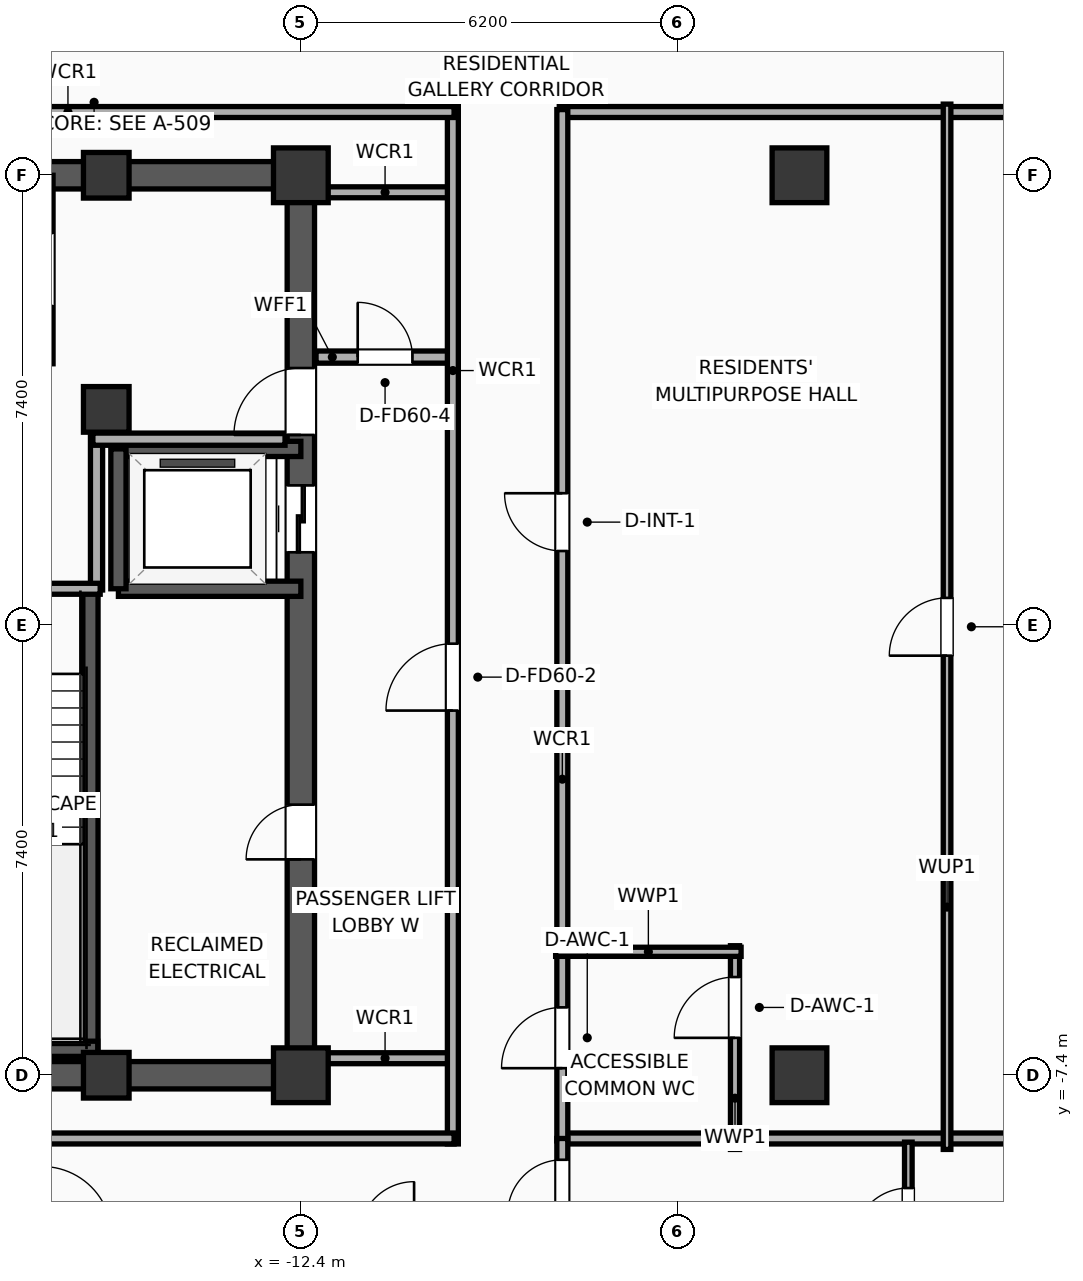
"""IFC4 building model, lengths in metres.
Left out: names, types, materials, properties, quantities, classifications, styles, units other than length and angle.
Written with IfcOpenShell. Run it as: python <this file> out.ifc"""

import sys

from ifc_helpers import new_model, si_unit, direction, frame, frame_2d, origin, origin_2d, place, context, subcontext, project, spatial, rectangle, extrude, element, fill, save


model = new_model("IFC4")
c1 = context("Model", 3, precision=1e-05, world=origin(), true_north=direction((0.0, 1.0)))
c2 = subcontext(c1, "Body", "Model", "MODEL_VIEW")
j1 = project(units=[si_unit("LENGTHUNIT", "METRE"), si_unit("PLANEANGLEUNIT", "RADIAN")], contexts=[c1])
p1 = place(None, origin())
s1 = spatial("IfcSite", under=j1, at=p1, CompositionType="ELEMENT")
p2 = place(p1, origin())
s2 = spatial("IfcBuilding", under=s1, at=p2, CompositionType="ELEMENT")
p3 = place(p2, frame((0.0, 0.0, 211.9)))
s3 = spatial("IfcBuildingStorey", under=s2, at=p3, CompositionType="ELEMENT", Elevation=211.9)
for number, where, z_axis, x_axis in (
    (1, (-15.6, -7.4, 0.0), (0.0, 0.0, 1.0), (1.0, 0.0, 0.0)),
    (2, (-15.6, 7.4, 0.0), (0.0, 0.0, 1.0), (1.0, 0.0, 0.0)),
):
    element("IfcColumn", number, at=place(p3, frame(where, z_axis=z_axis, x_axis=x_axis)), inside=s3, PredefinedType="COLUMN", context=c2, shape_type="SweptSolid", body=[
        extrude(rectangle(XDim=0.75, YDim=0.75, at=origin_2d()), origin(), (0.0, 0.0, 1.0), 3.9),
    ])
p4 = place(p3, frame((-12.4, -7.4, 0.0), z_axis=(0.0, 0.0, 1.0), x_axis=(1.0, 0.0, 0.0)))
e3 = element("IfcColumn", 3, at=p4, inside=s3, PredefinedType="COLUMN", context=c2, shape_type="SweptSolid", body=[
    extrude(rectangle(XDim=0.9, YDim=0.9, at=origin_2d()), origin(), (0.0, 0.0, 1.0), 3.9),
])
p5 = place(p3, frame((-15.6, 3.55, 0.0), z_axis=(0.0, 0.0, 1.0), x_axis=(1.0, 0.0, 0.0)))
e4 = element("IfcColumn", 4, at=p5, inside=s3, PredefinedType="COLUMN", context=c2, shape_type="SweptSolid", body=[
    extrude(rectangle(XDim=0.75, YDim=0.75, at=origin_2d()), origin(), (0.0, 0.0, 1.0), 3.9),
])
p6 = place(p3, frame((-12.4, 7.4, 0.0), z_axis=(0.0, 0.0, 1.0), x_axis=(1.0, 0.0, 0.0)))
e5 = element("IfcColumn", 5, at=p6, inside=s3, PredefinedType="COLUMN", context=c2, shape_type="SweptSolid", body=[
    extrude(rectangle(XDim=0.9, YDim=0.9, at=origin_2d()), origin(), (0.0, 0.0, 1.0), 3.9),
])
for number, where, z_axis, x_axis in (
    (6, (-19.425, -7.4, 0.0), (0.0, 0.0, 1.0), (1.0, 0.0, 0.0)),
    (7, (-19.425, 7.4, 0.0), (0.0, 0.0, 1.0), (1.0, 0.0, 0.0)),
):
    element("IfcWall", number, at=place(p3, frame(where, z_axis=z_axis, x_axis=x_axis)), inside=s3, PredefinedType="SHEAR", context=c2, shape_type="SweptSolid", body=[
        extrude(rectangle(XDim=7.25, YDim=0.45, at=frame_2d((3.625, 0.0))), origin(), (0.0, 0.0, 1.0), 3.65),
    ])
p7 = place(p3, frame((-12.4, -7.4, 0.0), z_axis=(0.0, 0.0, 1.0), x_axis=(0.0, 1.0, 0.0)))
e8 = element("IfcWall", 8, at=p7, inside=s3, PredefinedType="SHEAR", context=c2, shape_type="SweptSolid", body=[
    extrude(rectangle(XDim=14.8, YDim=0.45, at=frame_2d((7.4, 0.0))), origin(), (0.0, 0.0, 1.0), 3.65),
])
p8 = place(p7, frame((8.6, 0.0, 0.0)))
e9 = element("IfcOpeningElement", 9, at=p8, cuts=e8, PredefinedType="OPENING", context=c2, shape_type="SweptSolid", body=[
    extrude(rectangle(XDim=1.1, YDim=2.05, at=frame_2d((0.55, 1.025))), frame((0.0, 0.235, 0.0), z_axis=(0.0, -1.0, 0.0), x_axis=(1.0, 0.0, 0.0)), (0.0, 0.0, 1.0), 0.47),
])
p9 = place(p7, frame((10.53, 0.0, 0.0)))
e10 = element("IfcOpeningElement", 10, at=p9, cuts=e8, PredefinedType="OPENING", context=c2, shape_type="SweptSolid", body=[
    extrude(rectangle(XDim=1.1, YDim=2.05, at=frame_2d((0.55, 1.025))), frame((0.0, 0.235, 0.0), z_axis=(0.0, -1.0, 0.0), x_axis=(1.0, 0.0, 0.0)), (0.0, 0.0, 1.0), 0.47),
])
p10 = place(p7, frame((3.55, 0.0, 0.0)))
e11 = element("IfcOpeningElement", 11, at=p10, cuts=e8, PredefinedType="OPENING", context=c2, shape_type="SweptSolid", body=[
    extrude(rectangle(XDim=0.9, YDim=2.05, at=frame_2d((0.45, 1.025))), frame((0.0, 0.235, 0.0), z_axis=(0.0, -1.0, 0.0), x_axis=(1.0, 0.0, 0.0)), (0.0, 0.0, 1.0), 0.47),
])
p11 = place(p3, frame((-15.86, -7.085, 0.0), z_axis=(0.0, 0.0, 1.0), x_axis=(0.0, 1.0, 0.0)))
e12 = element("IfcWall", 12, at=p11, inside=s3, PredefinedType="SOLIDWALL", context=c2, shape_type="SweptSolid", body=[
    extrude(rectangle(XDim=7.685, YDim=0.25, at=frame_2d((3.843, 0.0))), origin(), (0.0, 0.0, 1.0), 3.65),
])
p12 = place(p3, frame((-19.2, -6.965, 0.0), z_axis=(0.0, 0.0, 1.0), x_axis=(1.0, 0.0, 0.0)))
e13 = element("IfcWall", 13, at=p12, inside=s3, PredefinedType="SOLIDWALL", context=c2, shape_type="SweptSolid", body=[
    extrude(rectangle(XDim=3.46, YDim=0.25, at=frame_2d((1.73, 0.0))), origin(), (0.0, 0.0, 1.0), 3.65),
])
for number, where, z_axis, x_axis in (
    (14, (-4.2, -7.4, 0.0), (0.0, 0.0, 1.0), (1.0, 0.0, 0.0)),
    (15, (-4.2, 7.4, 0.0), (0.0, 0.0, 1.0), (1.0, 0.0, 0.0)),
):
    element("IfcColumn", number, at=place(p3, frame(where, z_axis=z_axis, x_axis=x_axis)), inside=s3, PredefinedType="COLUMN", context=c2, shape_type="SweptSolid", body=[
        extrude(rectangle(XDim=0.9, YDim=0.9, at=origin_2d()), origin(), (0.0, 0.0, 1.0), 3.9),
    ])
p13 = place(p3, frame((-16.6, 4.3, 0.0), z_axis=(0.0, 0.0, 1.0), x_axis=(0.0, 1.0, 0.0)))
e16 = element("IfcWall", 16, at=p13, inside=s3, PredefinedType="SOLIDWALL", context=c2, shape_type="SweptSolid", body=[
    extrude(rectangle(XDim=3.1, YDim=0.25, at=frame_2d((1.55, 0.0))), origin(), (0.0, 0.0, 1.0), 3.65),
])
p14 = place(p13, frame((0.95, 0.0, 0.0)))
e17 = element("IfcOpeningElement", 17, at=p14, cuts=e16, PredefinedType="OPENING", context=c2, shape_type="SweptSolid", body=[
    extrude(rectangle(XDim=1.2, YDim=2.05, at=frame_2d((0.6, 1.025))), frame((0.0, 0.135, 0.0), z_axis=(0.0, -1.0, 0.0), x_axis=(1.0, 0.0, 0.0)), (0.0, 0.0, 1.0), 0.27),
])
for number, where, z_axis, x_axis in (
    (18, (-15.4, 0.6, 0.0), (0.0, 0.0, 1.0), (1.0, 0.0, 0.0)),
    (19, (-12.4, 2.9, 0.0), (0.0, 0.0, 1.0), (-1.0, 0.0, 0.0)),
):
    element("IfcWall", number, at=place(p3, frame(where, z_axis=z_axis, x_axis=x_axis)), inside=s3, PredefinedType="SOLIDWALL", context=c2, shape_type="SweptSolid", body=[
        extrude(rectangle(XDim=3.0, YDim=0.25, at=frame_2d((1.5, 0.0))), origin(), (0.0, 0.0, 1.0), 3.65),
    ])
p15 = place(p3, frame((-15.4, 2.9, 0.0), z_axis=(0.0, 0.0, 1.0), x_axis=(0.0, -1.0, 0.0)))
e20 = element("IfcWall", 20, at=p15, inside=s3, PredefinedType="SOLIDWALL", context=c2, shape_type="SweptSolid", body=[
    extrude(rectangle(XDim=2.3, YDim=0.25, at=frame_2d((1.15, 0.0))), origin(), (0.0, 0.0, 1.0), 3.65),
])
p16 = place(p3, frame((-15.76, 0.58, 0.0), z_axis=(0.0, 0.0, 1.0), x_axis=(0.0, 1.0, 0.0)))
e21 = element("IfcWall", 21, at=p16, inside=s3, PredefinedType="PARTITIONING", context=c2, shape_type="SweptSolid", body=[
    extrude(rectangle(XDim=2.52, YDim=0.2, at=frame_2d((1.26, 0.0))), origin(), (0.0, 0.0, 1.0), 3.65),
])
p17 = place(p3, frame((-15.82, 3.06, 0.0), z_axis=(0.0, 0.0, 1.0), x_axis=(1.0, 0.0, 0.0)))
e22 = element("IfcWall", 22, at=p17, inside=s3, PredefinedType="PARTITIONING", context=c2, shape_type="SweptSolid", body=[
    extrude(rectangle(XDim=3.16, YDim=0.2, at=frame_2d((1.58, 0.0))), origin(), (0.0, 0.0, 1.0), 3.65),
])
p18 = place(p3, frame((-19.06, 0.6, 0.0), z_axis=(0.0, 0.0, 1.0), x_axis=(1.0, 0.0, 0.0)))
e23 = element("IfcWall", 23, at=p18, inside=s3, PredefinedType="PARTITIONING", context=c2, shape_type="SweptSolid", body=[
    extrude(rectangle(XDim=3.36, YDim=0.18, at=frame_2d((1.68, 0.0))), origin(), (0.0, 0.0, 1.0), 3.65),
])
p19 = place(p18, frame((1.155, 0.0, 0.0)))
e24 = element("IfcOpeningElement", 24, at=p19, cuts=e23, PredefinedType="OPENING", context=c2, shape_type="SweptSolid", body=[
    extrude(rectangle(XDim=1.05, YDim=2.05, at=frame_2d((0.525, 1.025))), frame((0.0, 0.1, 0.0), z_axis=(0.0, -1.0, 0.0), x_axis=(1.0, 0.0, 0.0)), (0.0, 0.0, 1.0), 0.2),
])
p20 = place(p3, frame((-12.15, 4.41, 0.0), z_axis=(0.0, 0.0, 1.0), x_axis=(1.0, 0.0, 0.0)))
e25 = element("IfcWall", 25, at=p20, inside=s3, PredefinedType="PARTITIONING", context=c2, shape_type="SweptSolid", body=[
    extrude(rectangle(XDim=2.27, YDim=0.2, at=frame_2d((1.135, 0.0))), origin(), (0.0, 0.0, 1.0), 3.65),
])
p21 = place(p20, frame((0.685, 0.0, 0.0)))
e26 = element("IfcOpeningElement", 26, at=p21, cuts=e25, PredefinedType="OPENING", context=c2, shape_type="SweptSolid", body=[
    extrude(rectangle(XDim=0.9, YDim=2.05, at=frame_2d((0.45, 1.025))), frame((0.0, 0.11, 0.0), z_axis=(0.0, -1.0, 0.0), x_axis=(1.0, 0.0, 0.0)), (0.0, 0.0, 1.0), 0.22),
])
for number, where, z_axis, x_axis in (
    (27, (-12.15, 7.12, 0.0), (0.0, 0.0, 1.0), (1.0, 0.0, 0.0)),
    (28, (-12.15, -7.12, 0.0), (0.0, 0.0, 1.0), (1.0, 0.0, 0.0)),
):
    element("IfcWall", number, at=place(p3, frame(where, z_axis=z_axis, x_axis=x_axis)), inside=s3, PredefinedType="PARTITIONING", context=c2, shape_type="SweptSolid", body=[
        extrude(rectangle(XDim=2.27, YDim=0.18, at=frame_2d((1.135, 0.0))), origin(), (0.0, 0.0, 1.0), 3.65),
    ])
p22 = place(p3, frame((-9.9, -8.53, 0.0), z_axis=(0.0, 0.0, 1.0), x_axis=(0.0, 1.0, 0.0)))
e29 = element("IfcWall", 29, at=p22, inside=s3, PredefinedType="PARTITIONING", context=c2, shape_type="SweptSolid", body=[
    extrude(rectangle(XDim=17.06, YDim=0.18, at=frame_2d((8.53, 0.0))), origin(), (0.0, 0.0, 1.0), 3.65),
])
p23 = place(p22, frame((7.127, 0.0, 0.0)))
e30 = element("IfcOpeningElement", 30, at=p23, cuts=e29, PredefinedType="OPENING", context=c2, shape_type="SweptSolid", body=[
    extrude(rectangle(XDim=1.1, YDim=2.05, at=frame_2d((0.55, 1.025))), frame((0.0, 0.1, 0.0), z_axis=(0.0, -1.0, 0.0), x_axis=(1.0, 0.0, 0.0)), (0.0, 0.0, 1.0), 0.2),
])
p24 = place(p3, frame((-26.23, 8.44, 0.0), z_axis=(0.0, 0.0, 1.0), x_axis=(1.0, 0.0, 0.0)))
e31 = element("IfcWall", 31, at=p24, inside=s3, PredefinedType="PARTITIONING", context=c2, shape_type="SweptSolid", body=[
    extrude(rectangle(XDim=16.35, YDim=0.18, at=frame_2d((8.175, 0.0))), origin(), (0.0, 0.0, 1.0), 3.65),
])
p25 = place(p24, frame((2.35, 0.0, 0.0)))
e32 = element("IfcOpeningElement", 32, at=p25, cuts=e31, PredefinedType="OPENING", context=c2, shape_type="SweptSolid", body=[
    extrude(rectangle(XDim=1.15, YDim=2.05, at=frame_2d((0.575, 1.025))), frame((0.0, 0.1, 0.0), z_axis=(0.0, -1.0, 0.0), x_axis=(1.0, 0.0, 0.0)), (0.0, 0.0, 1.0), 0.2),
])
p26 = place(p3, frame((-26.23, -8.44, 0.0), z_axis=(0.0, 0.0, 1.0), x_axis=(1.0, 0.0, 0.0)))
e33 = element("IfcWall", 33, at=p26, inside=s3, PredefinedType="PARTITIONING", context=c2, shape_type="SweptSolid", body=[
    extrude(rectangle(XDim=16.35, YDim=0.18, at=frame_2d((8.175, 0.0))), origin(), (0.0, 0.0, 1.0), 3.65),
])
p27 = place(p3, frame((-8.15, 8.44, 0.0), z_axis=(0.0, 0.0, 1.0), x_axis=(1.0, 0.0, 0.0)))
e34 = element("IfcWall", 34, at=p27, inside=s3, PredefinedType="PARTITIONING", context=c2, shape_type="SweptSolid", body=[
    extrude(rectangle(XDim=16.3, YDim=0.18, at=frame_2d((8.15, 0.0))), origin(), (0.0, 0.0, 1.0), 3.65),
])
p28 = place(p27, frame((8.49, 0.0, 0.0)))
e35 = element("IfcOpeningElement", 35, at=p28, cuts=e34, PredefinedType="OPENING", context=c2, shape_type="SweptSolid", body=[
    extrude(rectangle(XDim=0.95, YDim=2.05, at=frame_2d((0.475, 1.025))), frame((0.0, 0.1, 0.0), z_axis=(0.0, -1.0, 0.0), x_axis=(1.0, 0.0, 0.0)), (0.0, 0.0, 1.0), 0.2),
])
p29 = place(p3, frame((-8.15, -8.44, 0.0), z_axis=(0.0, 0.0, 1.0), x_axis=(1.0, 0.0, 0.0)))
e36 = element("IfcWall", 36, at=p29, inside=s3, PredefinedType="PARTITIONING", context=c2, shape_type="SweptSolid", body=[
    extrude(rectangle(XDim=16.3, YDim=0.18, at=frame_2d((8.15, 0.0))), origin(), (0.0, 0.0, 1.0), 3.65),
])
p30 = place(p3, frame((-8.1, -8.48, 0.0), z_axis=(0.0, 0.0, 1.0), x_axis=(0.0, 1.0, 0.0)))
e37 = element("IfcWall", 37, at=p30, inside=s3, PredefinedType="PARTITIONING", context=c2, shape_type="SweptSolid", body=[
    extrude(rectangle(XDim=16.96, YDim=0.18, at=frame_2d((8.48, 0.0))), origin(), (0.0, 0.0, 1.0), 3.65),
])
p31 = place(p30, frame((1.196, 0.0, 0.0)))
e38 = element("IfcOpeningElement", 38, at=p31, cuts=e37, PredefinedType="OPENING", context=c2, shape_type="SweptSolid", body=[
    extrude(rectangle(XDim=1.0, YDim=2.05, at=frame_2d((0.5, 1.025))), frame((0.0, 0.1, 0.0), z_axis=(0.0, -1.0, 0.0), x_axis=(1.0, 0.0, 0.0)), (0.0, 0.0, 1.0), 0.2),
])
p32 = place(p30, frame((9.701, 0.0, 0.0)))
e39 = element("IfcOpeningElement", 39, at=p32, cuts=e37, PredefinedType="OPENING", context=c2, shape_type="SweptSolid", body=[
    extrude(rectangle(XDim=0.95, YDim=2.05, at=frame_2d((0.475, 1.025))), frame((0.0, 0.1, 0.0), z_axis=(0.0, -1.0, 0.0), x_axis=(1.0, 0.0, 0.0)), (0.0, 0.0, 1.0), 0.2),
])
p33 = place(p3, frame((-5.26, -8.62, 0.0), z_axis=(0.0, 0.0, 1.0), x_axis=(0.0, 1.0, 0.0)))
e40 = element("IfcWall", 40, at=p33, inside=s3, PredefinedType="PLUMBINGWALL", context=c2, shape_type="SweptSolid", body=[
    extrude(rectangle(XDim=3.35, YDim=0.15, at=frame_2d((1.675, 0.0))), origin(), (0.0, 0.0, 1.0), 3.65),
])
p34 = place(p33, frame((1.835, 0.0, 0.0)))
e41 = element("IfcOpeningElement", 41, at=p34, cuts=e40, PredefinedType="OPENING", context=c2, shape_type="SweptSolid", body=[
    extrude(rectangle(XDim=1.0, YDim=2.05, at=frame_2d((0.5, 1.025))), frame((0.0, 0.085, 0.0), z_axis=(0.0, -1.0, 0.0), x_axis=(1.0, 0.0, 0.0)), (0.0, 0.0, 1.0), 0.17),
])
p35 = place(p3, frame((-8.21, -5.37, 0.0), z_axis=(0.0, 0.0, 1.0), x_axis=(1.0, 0.0, 0.0)))
e42 = element("IfcWall", 42, at=p35, inside=s3, PredefinedType="PLUMBINGWALL", context=c2, shape_type="SweptSolid", body=[
    extrude(rectangle(XDim=3.05, YDim=0.15, at=frame_2d((1.525, 0.0))), origin(), (0.0, 0.0, 1.0), 3.65),
])
p36 = place(p3, frame((-1.773, -8.62, 0.0), z_axis=(0.0, 0.0, 1.0), x_axis=(0.0, 1.0, 0.0)))
e43 = element("IfcWall", 43, at=p36, inside=s3, PredefinedType="PARTITIONING", context=c2, shape_type="SweptSolid", body=[
    extrude(rectangle(XDim=17.19, YDim=0.125, at=frame_2d((8.595, 0.0))), origin(), (0.0, 0.0, 1.0), 3.65),
])
p37 = place(p36, frame((8.12, 0.0, 0.0)))
e44 = element("IfcOpeningElement", 44, at=p37, cuts=e43, PredefinedType="OPENING", context=c2, shape_type="SweptSolid", body=[
    extrude(rectangle(XDim=0.95, YDim=2.05, at=frame_2d((0.475, 1.025))), frame((0.0, 0.073, 0.0), z_axis=(0.0, -1.0, 0.0), x_axis=(1.0, 0.0, 0.0)), (0.0, 0.0, 1.0), 0.145),
])
p38 = place(p3, frame((-2.41, -10.91, 0.0), z_axis=(0.0, 0.0, 1.0), x_axis=(0.0, 1.0, 0.0)))
e45 = element("IfcWall", 45, at=p38, inside=s3, PredefinedType="PARTITIONING", context=c2, shape_type="SweptSolid", body=[
    extrude(rectangle(XDim=2.41, YDim=0.125, at=frame_2d((1.205, 0.0))), origin(), (0.0, 0.0, 1.0), 3.65),
])
p39 = place(p38, frame((0.755, 0.0, 0.0)))
e46 = element("IfcOpeningElement", 46, at=p39, cuts=e45, PredefinedType="OPENING", context=c2, shape_type="SweptSolid", body=[
    extrude(rectangle(XDim=0.9, YDim=2.05, at=frame_2d((0.45, 1.025))), frame((0.0, 0.073, 0.0), z_axis=(0.0, -1.0, 0.0), x_axis=(1.0, 0.0, 0.0)), (0.0, 0.0, 1.0), 0.145),
])
p40 = place(p3, frame((-8.1, -18.83, 0.0), z_axis=(0.0, 0.0, 1.0), x_axis=(0.0, 1.0, 0.0)))
e47 = element("IfcWall", 47, at=p40, inside=s3, PredefinedType="PARTITIONING", context=c2, shape_type="SweptSolid", body=[
    extrude(rectangle(XDim=10.39, YDim=0.18, at=frame_2d((5.195, 0.0))), origin(), (0.0, 0.0, 1.0), 3.65),
])
p41 = place(p40, frame((9.14, 0.0, 0.0)))
e48 = element("IfcOpeningElement", 48, at=p41, cuts=e47, PredefinedType="OPENING", context=c2, shape_type="SweptSolid", body=[
    extrude(rectangle(XDim=0.9, YDim=2.05, at=frame_2d((0.45, 1.025))), frame((0.0, 0.1, 0.0), z_axis=(0.0, -1.0, 0.0), x_axis=(1.0, 0.0, 0.0)), (0.0, 0.0, 1.0), 0.2),
])
p42 = place(p8, origin())
e49 = element("IfcDoor", 49, at=p42, inside=s3, OperationType="SLIDING_TO_LEFT", PredefinedType="DOOR", context=c2, shape_type="SweptSolid", body=[
    extrude(rectangle(XDim=1.1, YDim=2.05, at=frame_2d((0.55, 1.025))), frame((0.0, 0.025, 0.0), z_axis=(0.0, -1.0, 0.0), x_axis=(1.0, 0.0, 0.0)), (0.0, 0.0, 1.0), 0.05),
])
fill(e9, e49)
p43 = place(p21, origin())
e50 = element("IfcDoor", 50, at=p43, inside=s3, OperationType="SINGLE_SWING_LEFT", PredefinedType="DOOR", context=c2, shape_type="SweptSolid", body=[
    extrude(rectangle(XDim=0.9, YDim=2.05, at=frame_2d((0.45, 1.025))), frame((0.0, 0.025, 0.0), z_axis=(0.0, -1.0, 0.0), x_axis=(1.0, 0.0, 0.0)), (0.0, 0.0, 1.0), 0.05),
])
fill(e26, e50)
p44 = place(p23, origin())
e51 = element("IfcDoor", 51, at=p44, inside=s3, OperationType="SINGLE_SWING_LEFT", PredefinedType="DOOR", context=c2, shape_type="SweptSolid", body=[
    extrude(rectangle(XDim=1.1, YDim=2.05, at=frame_2d((0.55, 1.025))), frame((0.0, 0.025, 0.0), z_axis=(0.0, -1.0, 0.0), x_axis=(1.0, 0.0, 0.0)), (0.0, 0.0, 1.0), 0.05),
])
fill(e30, e51)
p45 = place(p31, origin())
e52 = element("IfcDoor", 52, at=p45, inside=s3, OperationType="SINGLE_SWING_LEFT", PredefinedType="DOOR", context=c2, shape_type="SweptSolid", body=[
    extrude(rectangle(XDim=1.0, YDim=2.05, at=frame_2d((0.5, 1.025))), frame((0.0, 0.025, 0.0), z_axis=(0.0, -1.0, 0.0), x_axis=(1.0, 0.0, 0.0)), (0.0, 0.0, 1.0), 0.05),
])
fill(e38, e52)
p46 = place(p32, origin())
e53 = element("IfcDoor", 53, at=p46, inside=s3, OperationType="SINGLE_SWING_RIGHT", PredefinedType="DOOR", context=c2, shape_type="SweptSolid", body=[
    extrude(rectangle(XDim=0.95, YDim=2.05, at=frame_2d((0.475, 1.025))), frame((0.0, 0.025, 0.0), z_axis=(0.0, -1.0, 0.0), x_axis=(1.0, 0.0, 0.0)), (0.0, 0.0, 1.0), 0.05),
])
fill(e39, e53)
p47 = place(p34, origin())
e54 = element("IfcDoor", 54, at=p47, inside=s3, OperationType="SINGLE_SWING_LEFT", PredefinedType="DOOR", context=c2, shape_type="SweptSolid", body=[
    extrude(rectangle(XDim=1.0, YDim=2.05, at=frame_2d((0.5, 1.025))), frame((0.0, 0.025, 0.0), z_axis=(0.0, -1.0, 0.0), x_axis=(1.0, 0.0, 0.0)), (0.0, 0.0, 1.0), 0.05),
])
fill(e41, e54)
p48 = place(p37, origin())
e55 = element("IfcDoor", 55, at=p48, inside=s3, OperationType="SINGLE_SWING_LEFT", PredefinedType="DOOR", context=c2, shape_type="SweptSolid", body=[
    extrude(rectangle(XDim=0.95, YDim=2.05, at=frame_2d((0.475, 1.025))), frame((0.0, 0.025, 0.0), z_axis=(0.0, -1.0, 0.0), x_axis=(1.0, 0.0, 0.0)), (0.0, 0.0, 1.0), 0.05),
])
fill(e44, e55)
p49 = place(p39, origin())
e56 = element("IfcDoor", 56, at=p49, inside=s3, OperationType="SINGLE_SWING_LEFT", PredefinedType="DOOR", context=c2, shape_type="SweptSolid", body=[
    extrude(rectangle(XDim=0.9, YDim=2.05, at=frame_2d((0.45, 1.025))), frame((0.0, 0.025, 0.0), z_axis=(0.0, -1.0, 0.0), x_axis=(1.0, 0.0, 0.0)), (0.0, 0.0, 1.0), 0.05),
])
fill(e46, e56)
p50 = place(p41, origin())
e57 = element("IfcDoor", 57, at=p50, inside=s3, OperationType="SINGLE_SWING_LEFT", PredefinedType="DOOR", context=c2, shape_type="SweptSolid", body=[
    extrude(rectangle(XDim=0.9, YDim=2.05, at=frame_2d((0.45, 1.025))), frame((0.0, 0.025, 0.0), z_axis=(0.0, -1.0, 0.0), x_axis=(1.0, 0.0, 0.0)), (0.0, 0.0, 1.0), 0.05),
])
fill(e48, e57)
p51 = place(p9, origin())
e58 = element("IfcDoor", 58, at=p51, inside=s3, OperationType="SINGLE_SWING_LEFT", PredefinedType="DOOR", context=c2, shape_type="SweptSolid", body=[
    extrude(rectangle(XDim=1.1, YDim=2.05, at=frame_2d((0.55, 1.025))), frame((0.0, 0.025, 0.0), z_axis=(0.0, -1.0, 0.0), x_axis=(1.0, 0.0, 0.0)), (0.0, 0.0, 1.0), 0.05),
])
fill(e10, e58)
p52 = place(p10, origin())
e59 = element("IfcDoor", 59, at=p52, inside=s3, OperationType="SINGLE_SWING_LEFT", PredefinedType="DOOR", context=c2, shape_type="SweptSolid", body=[
    extrude(rectangle(XDim=0.9, YDim=2.05, at=frame_2d((0.45, 1.025))), frame((0.0, 0.025, 0.0), z_axis=(0.0, -1.0, 0.0), x_axis=(1.0, 0.0, 0.0)), (0.0, 0.0, 1.0), 0.05),
])
fill(e11, e59)
save(model, sys.argv[1])
